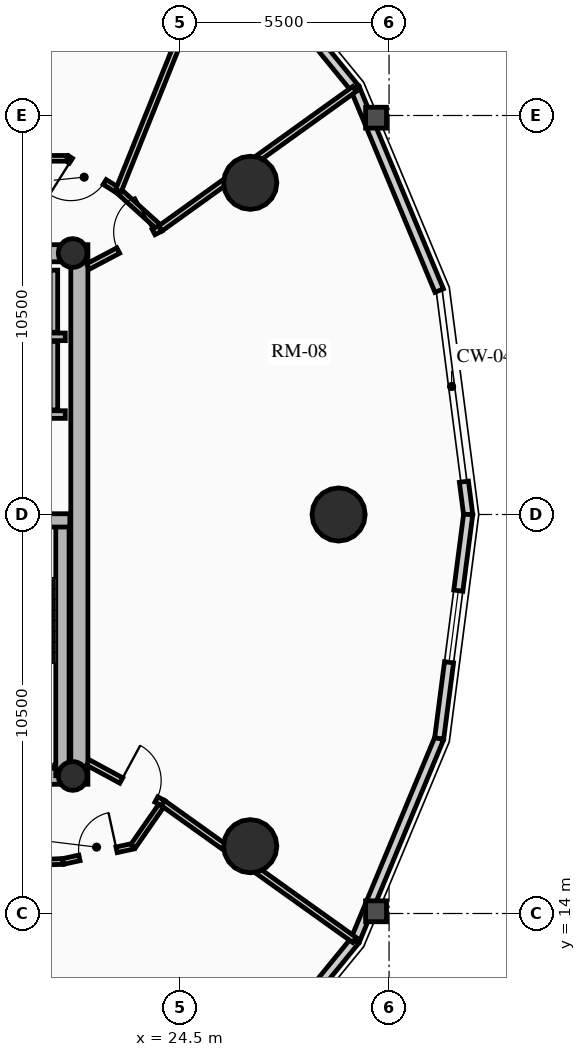
"""IFC4 building model, lengths in metres.
Left out: names, types, materials, properties, quantities, classifications, styles, units other than length and angle.
Written with IfcOpenShell. Run it as: python <this file> out.ifc"""

import sys

from ifc_helpers import new_model, si_unit, direction, frame, frame_2d, origin, origin_2d, place, context, subcontext, project, spatial, rectangle, circle, hollow_circle, extrude, source, transform, mapped, element, fill, save


model = new_model("IFC4")
c1 = context("Model", 3, precision=1e-05, world=origin(), true_north=direction((0.0, 1.0)))
c2 = subcontext(c1, "Body", "Model", "MODEL_VIEW")
j1 = project(units=[si_unit("LENGTHUNIT", "METRE"), si_unit("PLANEANGLEUNIT", "RADIAN")], contexts=[c1])
p1 = place(None, origin())
s1 = spatial("IfcSite", under=j1, at=p1, CompositionType="ELEMENT")
p2 = place(p1, origin())
s2 = spatial("IfcBuilding", under=s1, at=p2, CompositionType="ELEMENT")
p3 = place(p2, frame((0.0, 0.0, 116.71)))
s3 = spatial("IfcBuildingStorey", under=s2, at=p3, CompositionType="ELEMENT", Elevation=116.71)
p4 = place(p3, frame((21.85, 17.4, 0.0), z_axis=(0.0, 0.0, 1.0), x_axis=(0.0, 1.0, 0.0)))
e1 = element("IfcWall", 1, at=p4, inside=s3, PredefinedType="SHEAR", context=c2, shape_type="SweptSolid", body=[
    extrude(rectangle(XDim=14.2, YDim=0.45, at=frame_2d((7.1, 0.0))), origin(), (0.0, 0.0, 1.0), 2.91),
])
p5 = place(p3, frame((11.15, 17.625, 0.0), z_axis=(0.0, 0.0, 1.0), x_axis=(1.0, 0.0, 0.0)))
e2 = element("IfcWall", 2, at=p5, inside=s3, PredefinedType="SHEAR", context=c2, shape_type="SweptSolid", body=[
    extrude(rectangle(XDim=10.7, YDim=0.45, at=frame_2d((5.35, 0.0))), origin(), (0.0, 0.0, 1.0), 2.91),
])
m1 = source(origin(), c2, "Body", "SweptSolid", [
    extrude(rectangle(XDim=1.5, YDim=2.02, at=frame_2d((0.75, 1.01))), frame((0.0, 0.235, 0.0), z_axis=(0.0, -1.0, 0.0), x_axis=(1.0, 0.0, 0.0)), (0.0, 0.0, 1.0), 0.47),
])
p6 = place(p5, frame((5.45, 0.0, 0.0)))
e3 = element("IfcOpeningElement", 3, at=p6, cuts=e2, PredefinedType="OPENING", context=c2, shape_type="MappedRepresentation", body=[
    mapped(m1, transform((0.0, 0.0, 0.0), x_axis=(1.0, 0.0, 0.0), y_axis=(0.0, 1.0, 0.0), z_axis=(0.0, 0.0, 1.0), scale=1.0)),
])
p7 = place(p3, frame((11.15, 31.375, 0.0), z_axis=(0.0, 0.0, 1.0), x_axis=(1.0, 0.0, 0.0)))
e4 = element("IfcWall", 4, at=p7, inside=s3, PredefinedType="SHEAR", context=c2, shape_type="SweptSolid", body=[
    extrude(rectangle(XDim=10.7, YDim=0.45, at=frame_2d((5.35, 0.0))), origin(), (0.0, 0.0, 1.0), 2.91),
])
p8 = place(p7, frame((4.6, 0.0, 0.0)))
e5 = element("IfcOpeningElement", 5, at=p8, cuts=e4, PredefinedType="OPENING", context=c2, shape_type="MappedRepresentation", body=[
    mapped(m1, transform((0.0, 0.0, 0.0), x_axis=(1.0, 0.0, 0.0), y_axis=(0.0, 1.0, 0.0), z_axis=(0.0, 0.0, 1.0), scale=1.0)),
])
p9 = place(p3, frame((21.405, 17.625, 0.0), z_axis=(0.0, 0.0, 1.0), x_axis=(0.0, 1.0, 0.0)))
e6 = element("IfcWall", 6, at=p9, inside=s3, PredefinedType="SHEAR", context=c2, shape_type="SweptSolid", body=[
    extrude(rectangle(XDim=6.72, YDim=0.35, at=frame_2d((3.36, 0.0))), origin(), (0.0, 0.0, 1.0), 2.91),
])
p10 = place(p3, frame((18.315, 24.345, 0.0), z_axis=(0.0, 0.0, 1.0), x_axis=(1.0, 0.0, 0.0)))
e7 = element("IfcWall", 7, at=p10, inside=s3, PredefinedType="SHEAR", context=c2, shape_type="SweptSolid", body=[
    extrude(rectangle(XDim=3.285, YDim=0.35, at=frame_2d((1.643, 0.0))), origin(), (0.0, 0.0, 1.0), 2.91),
])
for number, where, z_axis, x_axis in (
    (8, (21.675, 17.62, 0.0), (0.0, 0.0, 1.0), (1.0, 0.0, 0.0)),
    (9, (21.675, 31.38, 0.0), (0.0, 0.0, 1.0), (1.0, 0.0, 0.0)),
):
    element("IfcColumn", number, at=place(p3, frame(where, z_axis=z_axis, x_axis=x_axis)), inside=s3, PredefinedType="COLUMN", context=c2, shape_type="SweptSolid", body=[
        extrude(hollow_circle(Radius=0.38, WallThickness=0.032, at=origin_2d()), origin(), (0.0, 0.0, 1.0), 2.91),
    ])
for number, where, z_axis, x_axis in (
    (10, (28.672, 24.5, 0.0), (0.0, 0.0, 1.0), (1.0, 0.0, 0.0)),
    (11, (26.347, 33.229, 0.0), (0.0, 0.0, 1.0), (1.0, 0.0, 0.0)),
    (12, (26.347, 15.771, 0.0), (0.0, 0.0, 1.0), (1.0, 0.0, 0.0)),
):
    element("IfcColumn", number, at=place(p3, frame(where, z_axis=z_axis, x_axis=x_axis)), inside=s3, PredefinedType="USERDEFINED", context=c2, shape_type="SweptSolid", body=[
        extrude(circle(Radius=0.7, at=origin_2d()), origin(), (0.0, 0.0, 1.0), 2.91),
    ])
p11 = place(p3, frame((31.969, 25.363, 0.0), z_axis=(0.0, 0.0, 1.0), x_axis=(0.128523364007, -0.991706481225, 0.0)))
e13 = element("IfcWall", 13, at=p11, inside=s3, PredefinedType="SOLIDWALL", context=c2, shape_type="SweptSolid", body=[
    extrude(rectangle(XDim=0.87, YDim=0.24, at=frame_2d((0.435, 0.0))), origin(), (0.0, 0.0, 1.0), 2.655),
])
p12 = place(p3, frame((29.105, 35.709, 0.0), z_axis=(0.0, 0.0, 1.0), x_axis=(0.384344417632, -0.923189779317, 0.0)))
e14 = element("IfcWall", 14, at=p12, inside=s3, PredefinedType="SOLIDWALL", context=c2, shape_type="SweptSolid", body=[
    extrude(rectangle(XDim=5.758, YDim=0.24, at=frame_2d((2.879, 0.0))), origin(), (0.0, 0.0, 1.0), 2.179),
])
p13 = place(p3, frame((25.658, 39.928, 0.0), z_axis=(0.0, 0.0, 1.0), x_axis=(0.632700781152, -0.77439635945, 0.0)))
e15 = element("IfcWall", 15, at=p13, inside=s3, PredefinedType="SOLIDWALL", context=c2, shape_type="SweptSolid", body=[
    extrude(rectangle(XDim=5.448, YDim=0.24, at=frame_2d((2.724, 0.0))), origin(), (0.0, 0.0, 1.0), 2.179),
])
m2 = source(origin(), c2, "Body", "SweptSolid", [
    extrude(rectangle(XDim=2.2, YDim=1.35, at=frame_2d((1.1, 0.675))), frame((0.0, 0.13, 0.0), z_axis=(0.0, -1.0, 0.0), x_axis=(1.0, 0.0, 0.0)), (0.0, 0.0, 1.0), 0.26),
])
p14 = place(p13, frame((1.624, 0.0, 0.65)))
e16 = element("IfcOpeningElement", 16, at=p14, cuts=e15, PredefinedType="OPENING", context=c2, shape_type="MappedRepresentation", body=[
    mapped(m2, transform((0.0, 0.0, 0.0), x_axis=(1.0, 0.0, 0.0), y_axis=(0.0, 1.0, 0.0), z_axis=(0.0, 0.0, 1.0), scale=1.0)),
])
p15 = place(p3, frame((29.105, 13.291, 0.0), z_axis=(0.0, 0.0, 1.0), x_axis=(-0.632700781152, -0.77439635945, 0.0)))
e17 = element("IfcWall", 17, at=p15, inside=s3, PredefinedType="SOLIDWALL", context=c2, shape_type="SweptSolid", body=[
    extrude(rectangle(XDim=5.448, YDim=0.24, at=frame_2d((2.724, 0.0))), origin(), (0.0, 0.0, 1.0), 2.179),
])
p16 = place(p15, frame((1.624, 0.0, 0.65)))
e18 = element("IfcOpeningElement", 18, at=p16, cuts=e17, PredefinedType="OPENING", context=c2, shape_type="MappedRepresentation", body=[
    mapped(m2, transform((0.0, 0.0, 0.0), x_axis=(1.0, 0.0, 0.0), y_axis=(0.0, 1.0, 0.0), z_axis=(0.0, 0.0, 1.0), scale=1.0)),
])
p17 = place(p3, frame((31.318, 18.607, 0.0), z_axis=(0.0, 0.0, 1.0), x_axis=(-0.384344417632, -0.923189779317, 0.0)))
e19 = element("IfcWall", 19, at=p17, inside=s3, PredefinedType="SOLIDWALL", context=c2, shape_type="SweptSolid", body=[
    extrude(rectangle(XDim=5.758, YDim=0.24, at=frame_2d((2.879, 0.0))), origin(), (0.0, 0.0, 1.0), 2.179),
])
p18 = place(p3, frame((32.081, 24.5, 0.0), z_axis=(0.0, 0.0, 1.0), x_axis=(-0.128351991996, -0.991728675672, 0.0)))
e20 = element("IfcWall", 20, at=p18, inside=s3, PredefinedType="SOLIDWALL", context=c2, shape_type="SweptSolid", body=[
    extrude(rectangle(XDim=5.942, YDim=0.24, at=frame_2d((2.971, 0.0))), origin(), (0.0, 0.0, 1.0), 2.179),
])
m3 = source(origin(), c2, "Body", "SweptSolid", [
    extrude(rectangle(XDim=1.9, YDim=1.35, at=frame_2d((0.95, 0.675))), frame((0.0, 0.13, 0.0), z_axis=(0.0, -1.0, 0.0), x_axis=(1.0, 0.0, 0.0)), (0.0, 0.0, 1.0), 0.26),
])
p19 = place(p18, frame((2.021, 0.0, 0.65)))
e21 = element("IfcOpeningElement", 21, at=p19, cuts=e20, PredefinedType="OPENING", context=c2, shape_type="MappedRepresentation", body=[
    mapped(m3, transform((0.0, 0.0, 0.0), x_axis=(1.0, 0.0, 0.0), y_axis=(0.0, 1.0, 0.0), z_axis=(0.0, 0.0, 1.0), scale=1.0)),
])
for number, where, z_axis, x_axis in (
    (22, (18.51, 27.13, 0.0), (0.0, 0.0, 1.0), (1.0, 0.0, 0.0)),
    (23, (18.51, 29.175, 0.0), (0.0, 0.0, 1.0), (1.0, 0.0, 0.0)),
):
    element("IfcWall", number, at=place(p3, frame(where, z_axis=z_axis, x_axis=x_axis)), inside=s3, PredefinedType="SHEAR", context=c2, shape_type="SweptSolid", body=[
        extrude(rectangle(XDim=2.97, YDim=0.2, at=frame_2d((1.485, 0.0))), origin(), (0.0, 0.0, 1.0), 2.91),
    ])
p20 = place(p3, frame((21.18, 27.25, 0.0), z_axis=(0.0, 0.0, 1.0), x_axis=(0.0, 1.0, 0.0)))
e24 = element("IfcWall", 24, at=p20, inside=s3, PredefinedType="SHEAR", context=c2, shape_type="SweptSolid", body=[
    extrude(rectangle(XDim=1.805, YDim=0.2, at=frame_2d((0.902, 0.0))), origin(), (0.0, 0.0, 1.0), 2.91),
])
p21 = place(p3, frame((21.18, 29.295, 0.0), z_axis=(0.0, 0.0, 1.0), x_axis=(0.0, 1.0, 0.0)))
e25 = element("IfcWall", 25, at=p21, inside=s3, PredefinedType="SHEAR", context=c2, shape_type="SweptSolid", body=[
    extrude(rectangle(XDim=1.635, YDim=0.2, at=frame_2d((0.817, 0.0))), origin(), (0.0, 0.0, 1.0), 2.91),
])
p22 = place(p3, frame((23.98, 32.027, 0.0), z_axis=(0.0, 0.0, 1.0), x_axis=(-0.742353224332, 0.670008724065, 0.0)))
e26 = element("IfcWall", 26, at=p22, inside=s3, PredefinedType="PARTITIONING", context=c2, shape_type="SweptSolid", body=[
    extrude(rectangle(XDim=1.485, YDim=0.15, at=frame_2d((0.742, 0.0))), origin(), (0.0, 0.0, 1.0), 2.225),
])
p23 = place(p3, frame((22.877, 33.022, 0.0), z_axis=(0.0, 0.0, 1.0), x_axis=(-0.845895608855, 0.533348496689, 0.0)))
e27 = element("IfcWall", 27, at=p23, inside=s3, PredefinedType="PARTITIONING", context=c2, shape_type="SweptSolid", body=[
    extrude(rectangle(XDim=1.597, YDim=0.15, at=frame_2d((0.798, 0.0))), origin(), (0.0, 0.0, 1.0), 2.225),
])
m4 = source(origin(), c2, "Body", "SweptSolid", [
    extrude(rectangle(XDim=1.05, YDim=2.015, at=frame_2d((0.525, 1.007))), frame((0.0, 0.085, 0.0), z_axis=(0.0, -1.0, 0.0), x_axis=(1.0, 0.0, 0.0)), (0.0, 0.0, 1.0), 0.17),
])
p24 = place(p23, frame((0.427, 0.0, 0.0)))
e28 = element("IfcOpeningElement", 28, at=p24, cuts=e27, PredefinedType="OPENING", context=c2, shape_type="MappedRepresentation", body=[
    mapped(m4, transform((0.0, 0.0, 0.0), x_axis=(1.0, 0.0, 0.0), y_axis=(0.0, 1.0, 0.0), z_axis=(0.0, 0.0, 1.0), scale=1.0)),
])
p25 = place(p3, frame((21.527, 33.873, 0.0), z_axis=(0.0, 0.0, 1.0), x_axis=(-0.999991838845, -0.004040079574, 0.0)))
e29 = element("IfcWall", 29, at=p25, inside=s3, PredefinedType="PARTITIONING", context=c2, shape_type="SweptSolid", body=[
    extrude(rectangle(XDim=3.384, YDim=0.15, at=frame_2d((1.692, 0.0))), origin(), (0.0, 0.0, 1.0), 2.225),
])
p26 = place(p3, frame((14.781, 15.141, 0.0), z_axis=(0.0, 0.0, 1.0), x_axis=(0.999407918707, 0.034406569513, 0.0)))
e30 = element("IfcWall", 30, at=p26, inside=s3, PredefinedType="PARTITIONING", context=c2, shape_type="SweptSolid", body=[
    extrude(rectangle(XDim=6.642, YDim=0.15, at=frame_2d((3.321, 0.0))), origin(), (0.0, 0.0, 1.0), 2.225),
])
p27 = place(p3, frame((21.419, 15.369, 0.0), z_axis=(0.0, 0.0, 1.0), x_axis=(0.977192701953, 0.212354475464, 0.0)))
e31 = element("IfcWall", 31, at=p27, inside=s3, PredefinedType="PARTITIONING", context=c2, shape_type="SweptSolid", body=[
    extrude(rectangle(XDim=1.888, YDim=0.15, at=frame_2d((0.944, 0.0))), origin(), (0.0, 0.0, 1.0), 2.225),
])
m5 = source(origin(), c2, "Body", "SweptSolid", [
    extrude(rectangle(XDim=1.0, YDim=2.015, at=frame_2d((0.5, 1.007))), frame((0.0, 0.085, 0.0), z_axis=(0.0, -1.0, 0.0), x_axis=(1.0, 0.0, 0.0)), (0.0, 0.0, 1.0), 0.17),
])
p28 = place(p27, frame((0.444, 0.0, 0.0)))
e32 = element("IfcOpeningElement", 32, at=p28, cuts=e31, PredefinedType="OPENING", context=c2, shape_type="MappedRepresentation", body=[
    mapped(m5, transform((0.0, 0.0, 0.0), x_axis=(1.0, 0.0, 0.0), y_axis=(0.0, 1.0, 0.0), z_axis=(0.0, 0.0, 1.0), scale=1.0)),
])
p29 = place(p3, frame((23.263, 15.77, 0.0), z_axis=(0.0, 0.0, 1.0), x_axis=(0.570743456919, 0.821128434768, 0.0)))
e33 = element("IfcWall", 33, at=p29, inside=s3, PredefinedType="PARTITIONING", context=c2, shape_type="SweptSolid", body=[
    extrude(rectangle(XDim=1.382, YDim=0.15, at=frame_2d((0.691, 0.0))), origin(), (0.0, 0.0, 1.0), 2.225),
])
p30 = place(p3, frame((23.98, 32.027, 0.0), z_axis=(0.0, 0.0, 1.0), x_axis=(0.812162479031, 0.58343132214, 0.0)))
e34 = element("IfcWall", 34, at=p30, inside=s3, PredefinedType="PARTITIONING", context=c2, shape_type="SweptSolid", body=[
    extrude(rectangle(XDim=6.291, YDim=0.16, at=frame_2d((3.146, 0.0))), origin(), (0.0, 0.0, 1.0), 2.179),
])
p31 = place(p3, frame((22.877, 33.022, 0.0), z_axis=(0.0, 0.0, 1.0), x_axis=(0.372898022516, 0.927872332168, 0.0)))
e35 = element("IfcWall", 35, at=p31, inside=s3, PredefinedType="PARTITIONING", context=c2, shape_type="SweptSolid", body=[
    extrude(rectangle(XDim=7.426, YDim=0.16, at=frame_2d((3.713, 0.0))), origin(), (0.0, 0.0, 1.0), 2.179),
])
p32 = place(p3, frame((24.052, 16.905, 0.0), z_axis=(0.0, 0.0, 1.0), x_axis=(0.813437670746, -0.581652091727, 0.0)))
e36 = element("IfcWall", 36, at=p32, inside=s3, PredefinedType="PARTITIONING", context=c2, shape_type="SweptSolid", body=[
    extrude(rectangle(XDim=6.192, YDim=0.16, at=frame_2d((3.096, 0.0))), origin(), (0.0, 0.0, 1.0), 2.179),
])
p33 = place(p3, frame((22.075, 31.025, 0.0), z_axis=(0.0, 0.0, 1.0), x_axis=(0.885026466958, 0.465540710125, 0.0)))
e37 = element("IfcWall", 37, at=p33, inside=s3, PredefinedType="PARTITIONING", context=c2, shape_type="SweptSolid", body=[
    extrude(rectangle(XDim=2.152, YDim=0.16, at=frame_2d((1.076, 0.0))), origin(), (0.0, 0.0, 1.0), 2.225),
])
m6 = source(origin(), c2, "Body", "SweptSolid", [
    extrude(rectangle(XDim=1.05, YDim=2.015, at=frame_2d((0.525, 1.007))), frame((0.0, 0.09, 0.0), z_axis=(0.0, -1.0, 0.0), x_axis=(1.0, 0.0, 0.0)), (0.0, 0.0, 1.0), 0.18),
])
p34 = place(p33, frame((0.902, 0.0, 0.0)))
e38 = element("IfcOpeningElement", 38, at=p34, cuts=e37, PredefinedType="OPENING", context=c2, shape_type="MappedRepresentation", body=[
    mapped(m6, transform((0.0, 0.0, 0.0), x_axis=(1.0, 0.0, 0.0), y_axis=(0.0, 1.0, 0.0), z_axis=(0.0, 0.0, 1.0), scale=1.0)),
])
p35 = place(p3, frame((22.075, 17.975, 0.0), z_axis=(0.0, 0.0, 1.0), x_axis=(0.879356383302, -0.476164206073, 0.0)))
e39 = element("IfcWall", 39, at=p35, inside=s3, PredefinedType="PARTITIONING", context=c2, shape_type="SweptSolid", body=[
    extrude(rectangle(XDim=2.248, YDim=0.16, at=frame_2d((1.124, 0.0))), origin(), (0.0, 0.0, 1.0), 2.225),
])
p36 = place(p35, frame((0.998, 0.0, 0.0)))
e40 = element("IfcOpeningElement", 40, at=p36, cuts=e39, PredefinedType="OPENING", context=c2, shape_type="MappedRepresentation", body=[
    mapped(m6, transform((0.0, 0.0, 0.0), x_axis=(1.0, 0.0, 0.0), y_axis=(0.0, 1.0, 0.0), z_axis=(0.0, 0.0, 1.0), scale=1.0)),
])
m7 = source(origin(), c2, "Body", "SweptSolid", [
    extrude(rectangle(XDim=1.9, YDim=1.35, at=frame_2d((0.95, 0.675))), frame((0.0, 0.03, 0.0), z_axis=(0.0, -1.0, 0.0), x_axis=(1.0, 0.0, 0.0)), (0.0, 0.0, 1.0), 0.06),
])
p37 = place(p19, origin())
e41 = element("IfcWindow", 41, at=p37, inside=s3, PartitioningType="DOUBLE_PANEL_VERTICAL", PredefinedType="WINDOW", context=c2, shape_type="MappedRepresentation", body=[
    mapped(m7, transform((0.0, 0.0, 0.0), x_axis=(1.0, 0.0, 0.0), y_axis=(0.0, 1.0, 0.0), z_axis=(0.0, 0.0, 1.0), scale=1.0)),
])
fill(e21, e41)
m8 = source(origin(), c2, "Body", "SweptSolid", [
    extrude(rectangle(XDim=1.05, YDim=2.015, at=frame_2d((0.525, 1.007))), frame((0.0, 0.025, 0.0), z_axis=(0.0, -1.0, 0.0), x_axis=(1.0, 0.0, 0.0)), (0.0, 0.0, 1.0), 0.05),
])
p38 = place(p34, origin())
e42 = element("IfcDoor", 42, at=p38, inside=s3, OperationType="SINGLE_SWING_RIGHT", PredefinedType="DOOR", context=c2, shape_type="MappedRepresentation", body=[
    mapped(m8, transform((0.0, 0.0, 0.0), x_axis=(1.0, 0.0, 0.0), y_axis=(0.0, 1.0, 0.0), z_axis=(0.0, 0.0, 1.0), scale=1.0)),
])
fill(e38, e42)
p39 = place(p36, origin())
e43 = element("IfcDoor", 43, at=p39, inside=s3, OperationType="SINGLE_SWING_LEFT", PredefinedType="DOOR", context=c2, shape_type="MappedRepresentation", body=[
    mapped(m8, transform((0.0, 0.0, 0.0), x_axis=(1.0, 0.0, 0.0), y_axis=(0.0, 1.0, 0.0), z_axis=(0.0, 0.0, 1.0), scale=1.0)),
])
fill(e40, e43)
p40 = place(p24, origin())
e44 = element("IfcDoor", 44, at=p40, inside=s3, OperationType="SINGLE_SWING_RIGHT", PredefinedType="DOOR", context=c2, shape_type="MappedRepresentation", body=[
    mapped(m8, transform((0.0, 0.0, 0.0), x_axis=(1.0, 0.0, 0.0), y_axis=(0.0, 1.0, 0.0), z_axis=(0.0, 0.0, 1.0), scale=1.0)),
])
fill(e28, e44)
m9 = source(origin(), c2, "Body", "SweptSolid", [
    extrude(rectangle(XDim=1.0, YDim=2.015, at=frame_2d((0.5, 1.007))), frame((0.0, 0.025, 0.0), z_axis=(0.0, -1.0, 0.0), x_axis=(1.0, 0.0, 0.0)), (0.0, 0.0, 1.0), 0.05),
])
p41 = place(p28, origin())
e45 = element("IfcDoor", 45, at=p41, inside=s3, OperationType="SINGLE_SWING_RIGHT", PredefinedType="DOOR", context=c2, shape_type="MappedRepresentation", body=[
    mapped(m9, transform((0.0, 0.0, 0.0), x_axis=(1.0, 0.0, 0.0), y_axis=(0.0, 1.0, 0.0), z_axis=(0.0, 0.0, 1.0), scale=1.0)),
])
fill(e32, e45)
save(model, sys.argv[1])
